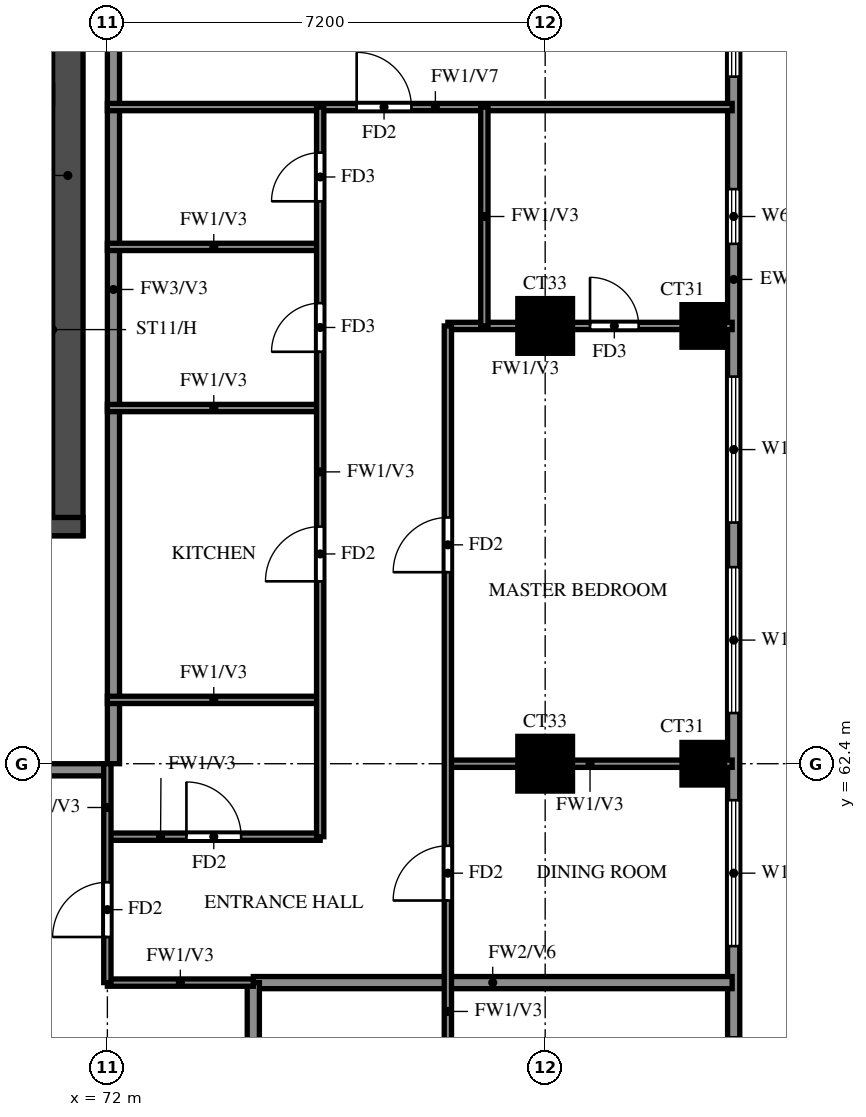
"""IFC4 building model, lengths in metres.
Left out: names, types, materials, properties, quantities, classifications, styles, units other than length and angle.
Written with IfcOpenShell. Run it as: python <this file> out.ifc"""

import sys

from ifc_helpers import new_model, si_unit, direction, frame, frame_2d, origin, origin_2d, place, context, subcontext, project, spatial, rectangle, extrude, source, transform, mapped, element, fill, save


model = new_model("IFC4")
c1 = context("Model", 3, precision=1e-05, world=origin(), true_north=direction((0.0, 1.0)))
c2 = subcontext(c1, "Body", "Model", "MODEL_VIEW")
j1 = project(units=[si_unit("LENGTHUNIT", "METRE"), si_unit("PLANEANGLEUNIT", "RADIAN")], contexts=[c1])
p1 = place(None, origin())
s1 = spatial("IfcSite", under=j1, at=p1, CompositionType="ELEMENT")
p2 = place(p1, origin())
s2 = spatial("IfcBuilding", under=s1, at=p2, CompositionType="ELEMENT")
p3 = place(p2, frame((0.0, 0.0, 211.5)))
s3 = spatial("IfcBuildingStorey", under=s2, at=p3, CompositionType="ELEMENT", Elevation=211.5)
m1 = source(origin(), c2, "Body", "SweptSolid", [
    extrude(rectangle(XDim=0.9, YDim=0.9, at=origin_2d()), origin(), (0.0, 0.0, 1.0), 3.22),
])
p4 = place(p3, frame((79.2, 62.4, 0.0), z_axis=(0.0, 0.0, 1.0), x_axis=(1.0, 0.0, 0.0)))
e1 = element("IfcColumn", 1, at=p4, inside=s3, PredefinedType="COLUMN", context=c2, shape_type="MappedRepresentation", body=[
    mapped(m1, transform((0.0, 0.0, 0.0))),
])
m2 = source(origin(), c2, "Body", "SweptSolid", [
    extrude(rectangle(XDim=0.7, YDim=0.7, at=origin_2d()), origin(), (0.0, 0.0, 1.0), 3.5),
])
p5 = place(p3, frame((81.8, 62.4, -0.28), z_axis=(0.0, 0.0, 1.0), x_axis=(1.0, 0.0, 0.0)))
e2 = element("IfcColumn", 2, at=p5, inside=s3, PredefinedType="COLUMN", context=c2, shape_type="MappedRepresentation", body=[
    mapped(m2, transform((0.0, 0.0, 0.0))),
])
p6 = place(p3, frame((79.2, 69.6, 0.0), z_axis=(0.0, 0.0, 1.0), x_axis=(1.0, 0.0, 0.0)))
e3 = element("IfcColumn", 3, at=p6, inside=s3, PredefinedType="COLUMN", context=c2, shape_type="MappedRepresentation", body=[
    mapped(m1, transform((0.0, 0.0, 0.0))),
])
p7 = place(p3, frame((81.8, 69.6, -0.28), z_axis=(0.0, 0.0, 1.0), x_axis=(1.0, 0.0, 0.0)))
e4 = element("IfcColumn", 4, at=p7, inside=s3, PredefinedType="COLUMN", context=c2, shape_type="MappedRepresentation", body=[
    mapped(m2, transform((0.0, 0.0, 0.0))),
])
p8 = place(p3, frame((71.35, 66.15, 0.0), z_axis=(0.0, 0.0, 1.0), x_axis=(0.0, 1.0, 0.0)))
e5 = element("IfcWall", 5, at=p8, inside=s3, PredefinedType="SHEAR", context=c2, shape_type="SweptSolid", body=[
    extrude(rectangle(XDim=11.85, YDim=0.5, at=frame_2d((5.925, 0.0))), origin(), (0.0, 0.0, 1.0), 3.22),
])
p9 = place(p3, frame((29.2, 66.3, 0.0), z_axis=(0.0, 0.0, 1.0), x_axis=(1.0, 0.0, 0.0)))
e6 = element("IfcWall", 6, at=p9, inside=s3, PredefinedType="SHEAR", context=c2, shape_type="SweptSolid", body=[
    extrude(rectangle(XDim=42.4, YDim=0.3, at=frame_2d((21.2, 0.0))), origin(), (0.0, 0.0, 1.0), 3.22),
])
p10 = place(p9, frame((1.425, 0.0, 0.0)))
e7 = element("IfcOpeningElement", 7, at=p10, cuts=e6, PredefinedType="OPENING", context=c2, shape_type="SweptSolid", body=[
    extrude(rectangle(XDim=1.1, YDim=2.1, at=frame_2d((0.55, 1.05))), frame((0.0, 0.16, 0.0), z_axis=(0.0, -1.0, 0.0), x_axis=(1.0, 0.0, 0.0)), (0.0, 0.0, 1.0), 0.32),
])
p11 = place(p9, frame((4.2, 0.0, 0.0)))
e8 = element("IfcOpeningElement", 8, at=p11, cuts=e6, PredefinedType="OPENING", context=c2, shape_type="SweptSolid", body=[
    extrude(rectangle(XDim=1.8, YDim=2.1, at=frame_2d((0.9, 1.05))), frame((0.0, 0.16, 0.0), z_axis=(0.0, -1.0, 0.0), x_axis=(1.0, 0.0, 0.0)), (0.0, 0.0, 1.0), 0.32),
])
p12 = place(p3, frame((82.3, 48.2, 0.0), z_axis=(0.0, 0.0, 1.0), x_axis=(0.0, 1.0, 0.0)))
e9 = element("IfcWall", 9, at=p12, inside=s3, PredefinedType="SOLIDWALL", context=c2, shape_type="SweptSolid", body=[
    extrude(rectangle(XDim=28.6, YDim=0.2, at=frame_2d((14.3, 0.0))), origin(), (0.0, 0.0, 1.0), 3.22),
])
p13 = place(p12, frame((4.3, 0.0, 0.0)))
e10 = element("IfcOpeningElement", 10, at=p13, cuts=e9, PredefinedType="OPENING", context=c2, shape_type="SweptSolid", body=[
    extrude(rectangle(XDim=1.8, YDim=2.4, at=frame_2d((0.9, 1.2))), frame((0.0, 0.11, 0.0), z_axis=(0.0, -1.0, 0.0), x_axis=(1.0, 0.0, 0.0)), (0.0, 0.0, 1.0), 0.22),
])
p14 = place(p12, frame((0.6, 0.0, 0.6)))
e11 = element("IfcOpeningElement", 11, at=p14, cuts=e9, PredefinedType="OPENING", context=c2, shape_type="SweptSolid", body=[
    extrude(rectangle(XDim=2.4, YDim=2.4, at=frame_2d((1.2, 1.2))), frame((0.0, 0.11, 0.0), z_axis=(0.0, -1.0, 0.0), x_axis=(1.0, 0.0, 0.0)), (0.0, 0.0, 1.0), 0.22),
])
p15 = place(p12, frame((7.3, 0.0, 0.6)))
e12 = element("IfcOpeningElement", 12, at=p15, cuts=e9, PredefinedType="OPENING", context=c2, shape_type="SweptSolid", body=[
    extrude(rectangle(XDim=2.4, YDim=2.4, at=frame_2d((1.2, 1.2))), frame((0.0, 0.11, 0.0), z_axis=(0.0, -1.0, 0.0), x_axis=(1.0, 0.0, 0.0)), (0.0, 0.0, 1.0), 0.22),
])
p16 = place(p12, frame((11.2, 0.0, 0.6)))
e13 = element("IfcOpeningElement", 13, at=p16, cuts=e9, PredefinedType="OPENING", context=c2, shape_type="SweptSolid", body=[
    extrude(rectangle(XDim=2.4, YDim=2.4, at=frame_2d((1.2, 1.2))), frame((0.0, 0.11, 0.0), z_axis=(0.0, -1.0, 0.0), x_axis=(1.0, 0.0, 0.0)), (0.0, 0.0, 1.0), 0.22),
])
p17 = place(p12, frame((15.033, 0.0, 0.6)))
e14 = element("IfcOpeningElement", 14, at=p17, cuts=e9, PredefinedType="OPENING", context=c2, shape_type="SweptSolid", body=[
    extrude(rectangle(XDim=2.4, YDim=2.4, at=frame_2d((1.2, 1.2))), frame((0.0, 0.11, 0.0), z_axis=(0.0, -1.0, 0.0), x_axis=(1.0, 0.0, 0.0)), (0.0, 0.0, 1.0), 0.22),
])
p18 = place(p12, frame((18.167, 0.0, 0.6)))
e15 = element("IfcOpeningElement", 15, at=p18, cuts=e9, PredefinedType="OPENING", context=c2, shape_type="SweptSolid", body=[
    extrude(rectangle(XDim=2.4, YDim=2.4, at=frame_2d((1.2, 1.2))), frame((0.0, 0.11, 0.0), z_axis=(0.0, -1.0, 0.0), x_axis=(1.0, 0.0, 0.0)), (0.0, 0.0, 1.0), 0.22),
])
p19 = place(p12, frame((22.75, 0.0, 1.5)))
e16 = element("IfcOpeningElement", 16, at=p19, cuts=e9, PredefinedType="OPENING", context=c2, shape_type="SweptSolid", body=[
    extrude(rectangle(XDim=0.9, YDim=0.9, at=frame_2d((0.45, 0.45))), frame((0.0, 0.11, 0.0), z_axis=(0.0, -1.0, 0.0), x_axis=(1.0, 0.0, 0.0)), (0.0, 0.0, 1.0), 0.22),
])
p20 = place(p12, frame((25.5, 0.0, 0.6)))
e17 = element("IfcOpeningElement", 17, at=p20, cuts=e9, PredefinedType="OPENING", context=c2, shape_type="SweptSolid", body=[
    extrude(rectangle(XDim=2.4, YDim=2.4, at=frame_2d((1.2, 1.2))), frame((0.0, 0.11, 0.0), z_axis=(0.0, -1.0, 0.0), x_axis=(1.0, 0.0, 0.0)), (0.0, 0.0, 1.0), 0.22),
])
p21 = place(p3, frame((67.2, 62.3, 0.0), z_axis=(0.0, 0.0, 1.0), x_axis=(1.0, 0.0, 0.0)))
e18 = element("IfcWall", 18, at=p21, inside=s3, PredefinedType="SOLIDWALL", context=c2, shape_type="SweptSolid", body=[
    extrude(rectangle(XDim=4.8, YDim=0.2, at=frame_2d((2.4, 0.0))), origin(), (0.0, 0.0, 1.0), 3.22),
])
p22 = place(p3, frame((72.1, 62.4, 0.0), z_axis=(0.0, 0.0, 1.0), x_axis=(0.0, 1.0, 0.0)))
e19 = element("IfcWall", 19, at=p22, inside=s3, PredefinedType="SOLIDWALL", context=c2, shape_type="SweptSolid", body=[
    extrude(rectangle(XDim=15.6, YDim=0.2, at=frame_2d((7.8, 0.0))), origin(), (0.0, 0.0, 1.0), 3.22),
])
p23 = place(p3, frame((74.4, 58.8, 0.0), z_axis=(0.0, 0.0, 1.0), x_axis=(1.0, 0.0, 0.0)))
e20 = element("IfcWall", 20, at=p23, inside=s3, PredefinedType="SOLIDWALL", context=c2, shape_type="SweptSolid", body=[
    extrude(rectangle(XDim=7.875, YDim=0.2, at=frame_2d((3.938, 0.0))), origin(), (0.0, 0.0, 1.0), 2.32),
])
p24 = place(p3, frame((74.4, 56.4, 0.0), z_axis=(0.0, 0.0, 1.0), x_axis=(0.0, 1.0, 0.0)))
e21 = element("IfcWall", 21, at=p24, inside=s3, PredefinedType="SOLIDWALL", context=c2, shape_type="SweptSolid", body=[
    extrude(rectangle(XDim=2.4, YDim=0.2, at=frame_2d((1.2, 0.0))), origin(), (0.0, 0.0, 1.0), 3.22),
])
p25 = place(p3, frame((72.0, 58.8, 0.0), z_axis=(0.0, 0.0, 1.0), x_axis=(1.0, 0.0, 0.0)))
e22 = element("IfcWall", 22, at=p25, inside=s3, PredefinedType="PARTITIONING", context=c2, shape_type="SweptSolid", body=[
    extrude(rectangle(XDim=2.4, YDim=0.12, at=frame_2d((1.2, 0.0))), origin(), (0.0, 0.0, 1.0), 3.22),
])
p26 = place(p3, frame((72.0, 61.2, 0.0), z_axis=(0.0, 0.0, 1.0), x_axis=(1.0, 0.0, 0.0)))
e23 = element("IfcWall", 23, at=p26, inside=s3, PredefinedType="PARTITIONING", context=c2, shape_type="SweptSolid", body=[
    extrude(rectangle(XDim=3.5, YDim=0.12, at=frame_2d((1.75, 0.0))), origin(), (0.0, 0.0, 1.0), 3.22),
])
p27 = place(p26, frame((1.3, 0.0, 0.0)))
e24 = element("IfcOpeningElement", 24, at=p27, cuts=e23, PredefinedType="OPENING", context=c2, shape_type="SweptSolid", body=[
    extrude(rectangle(XDim=0.9, YDim=2.1, at=frame_2d((0.45, 1.05))), frame((0.0, 0.07, 0.0), z_axis=(0.0, -1.0, 0.0), x_axis=(1.0, 0.0, 0.0)), (0.0, 0.0, 1.0), 0.14),
])
p28 = place(p3, frame((77.6, 62.4, 0.0), z_axis=(0.0, 0.0, 1.0), x_axis=(1.0, 0.0, 0.0)))
e25 = element("IfcWall", 25, at=p28, inside=s3, PredefinedType="PARTITIONING", context=c2, shape_type="SweptSolid", body=[
    extrude(rectangle(XDim=4.675, YDim=0.12, at=frame_2d((2.337, 0.0))), origin(), (0.0, 0.0, 1.0), 3.22),
])
for number, where, z_axis, x_axis in (
    (26, (72.0, 63.45, 0.0), (0.0, 0.0, 1.0), (1.0, 0.0, 0.0)),
    (27, (72.0, 68.25, 0.0), (0.0, 0.0, 1.0), (1.0, 0.0, 0.0)),
):
    element("IfcWall", number, at=place(p3, frame(where, z_axis=z_axis, x_axis=x_axis)), inside=s3, PredefinedType="PARTITIONING", context=c2, shape_type="SweptSolid", body=[
        extrude(rectangle(XDim=3.5, YDim=0.12, at=frame_2d((1.75, 0.0))), origin(), (0.0, 0.0, 1.0), 3.22),
    ])
p29 = place(p3, frame((77.6, 69.6, 0.0), z_axis=(0.0, 0.0, 1.0), x_axis=(1.0, 0.0, 0.0)))
e28 = element("IfcWall", 28, at=p29, inside=s3, PredefinedType="PARTITIONING", context=c2, shape_type="SweptSolid", body=[
    extrude(rectangle(XDim=4.675, YDim=0.12, at=frame_2d((2.337, 0.0))), origin(), (0.0, 0.0, 1.0), 3.22),
])
p30 = place(p29, frame((2.337, 0.0, 0.0)))
e29 = element("IfcOpeningElement", 29, at=p30, cuts=e28, PredefinedType="OPENING", context=c2, shape_type="SweptSolid", body=[
    extrude(rectangle(XDim=0.8, YDim=2.1, at=frame_2d((0.4, 1.05))), frame((0.0, 0.07, 0.0), z_axis=(0.0, -1.0, 0.0), x_axis=(1.0, 0.0, 0.0)), (0.0, 0.0, 1.0), 0.14),
])
p31 = place(p3, frame((72.0, 70.9, 0.0), z_axis=(0.0, 0.0, 1.0), x_axis=(1.0, 0.0, 0.0)))
e30 = element("IfcWall", 30, at=p31, inside=s3, PredefinedType="PARTITIONING", context=c2, shape_type="SweptSolid", body=[
    extrude(rectangle(XDim=3.5, YDim=0.12, at=frame_2d((1.75, 0.0))), origin(), (0.0, 0.0, 1.0), 3.22),
])
p32 = place(p3, frame((72.0, 73.2, 0.0), z_axis=(0.0, 0.0, 1.0), x_axis=(1.0, 0.0, 0.0)))
e31 = element("IfcWall", 31, at=p32, inside=s3, PredefinedType="PARTITIONING", context=c2, shape_type="SweptSolid", body=[
    extrude(rectangle(XDim=10.275, YDim=0.12, at=frame_2d((5.137, 0.0))), origin(), (0.0, 0.0, 1.0), 2.32),
])
p33 = place(p32, frame((4.1, 0.0, 0.0)))
e32 = element("IfcOpeningElement", 32, at=p33, cuts=e31, PredefinedType="OPENING", context=c2, shape_type="SweptSolid", body=[
    extrude(rectangle(XDim=0.9, YDim=2.1, at=frame_2d((0.45, 1.05))), frame((0.0, 0.07, 0.0), z_axis=(0.0, -1.0, 0.0), x_axis=(1.0, 0.0, 0.0)), (0.0, 0.0, 1.0), 0.14),
])
p34 = place(p3, frame((72.0, 58.8, 0.0), z_axis=(0.0, 0.0, 1.0), x_axis=(0.0, 1.0, 0.0)))
e33 = element("IfcWall", 33, at=p34, inside=s3, PredefinedType="PARTITIONING", context=c2, shape_type="SweptSolid", body=[
    extrude(rectangle(XDim=3.6, YDim=0.12, at=frame_2d((1.8, 0.0))), origin(), (0.0, 0.0, 1.0), 3.22),
])
p35 = place(p34, frame((0.75, 0.0, 0.0)))
e34 = element("IfcOpeningElement", 34, at=p35, cuts=e33, PredefinedType="OPENING", context=c2, shape_type="SweptSolid", body=[
    extrude(rectangle(XDim=0.9, YDim=2.1, at=frame_2d((0.45, 1.05))), frame((0.0, 0.07, 0.0), z_axis=(0.0, -1.0, 0.0), x_axis=(1.0, 0.0, 0.0)), (0.0, 0.0, 1.0), 0.14),
])
p36 = place(p3, frame((75.5, 61.2, 0.0), z_axis=(0.0, 0.0, 1.0), x_axis=(0.0, 1.0, 0.0)))
e35 = element("IfcWall", 35, at=p36, inside=s3, PredefinedType="PARTITIONING", context=c2, shape_type="SweptSolid", body=[
    extrude(rectangle(XDim=12.0, YDim=0.12, at=frame_2d((6.0, 0.0))), origin(), (0.0, 0.0, 1.0), 3.22),
])
p37 = place(p36, frame((4.2, 0.0, 0.0)))
e36 = element("IfcOpeningElement", 36, at=p37, cuts=e35, PredefinedType="OPENING", context=c2, shape_type="SweptSolid", body=[
    extrude(rectangle(XDim=0.9, YDim=2.1, at=frame_2d((0.45, 1.05))), frame((0.0, 0.07, 0.0), z_axis=(0.0, -1.0, 0.0), x_axis=(1.0, 0.0, 0.0)), (0.0, 0.0, 1.0), 0.14),
])
p38 = place(p36, frame((7.975, 0.0, 0.0)))
e37 = element("IfcOpeningElement", 37, at=p38, cuts=e35, PredefinedType="OPENING", context=c2, shape_type="SweptSolid", body=[
    extrude(rectangle(XDim=0.8, YDim=2.1, at=frame_2d((0.4, 1.05))), frame((0.0, 0.07, 0.0), z_axis=(0.0, -1.0, 0.0), x_axis=(1.0, 0.0, 0.0)), (0.0, 0.0, 1.0), 0.14),
])
p39 = place(p36, frame((10.45, 0.0, 0.0)))
e38 = element("IfcOpeningElement", 38, at=p39, cuts=e35, PredefinedType="OPENING", context=c2, shape_type="SweptSolid", body=[
    extrude(rectangle(XDim=0.8, YDim=2.1, at=frame_2d((0.4, 1.05))), frame((0.0, 0.07, 0.0), z_axis=(0.0, -1.0, 0.0), x_axis=(1.0, 0.0, 0.0)), (0.0, 0.0, 1.0), 0.14),
])
p40 = place(p3, frame((77.6, 48.125, 0.0), z_axis=(0.0, 0.0, 1.0), x_axis=(0.0, 1.0, 0.0)))
e39 = element("IfcWall", 39, at=p40, inside=s3, PredefinedType="PARTITIONING", context=c2, shape_type="SweptSolid", body=[
    extrude(rectangle(XDim=21.475, YDim=0.12, at=frame_2d((10.738, 0.0))), origin(), (0.0, 0.0, 1.0), 3.22),
])
p41 = place(p40, frame((1.288, 0.0, 0.0)))
e40 = element("IfcOpeningElement", 40, at=p41, cuts=e39, PredefinedType="OPENING", context=c2, shape_type="SweptSolid", body=[
    extrude(rectangle(XDim=0.9, YDim=2.1, at=frame_2d((0.45, 1.05))), frame((0.0, 0.07, 0.0), z_axis=(0.0, -1.0, 0.0), x_axis=(1.0, 0.0, 0.0)), (0.0, 0.0, 1.0), 0.14),
])
p42 = place(p40, frame((7.825, 0.0, 0.0)))
e41 = element("IfcOpeningElement", 41, at=p42, cuts=e39, PredefinedType="OPENING", context=c2, shape_type="SweptSolid", body=[
    extrude(rectangle(XDim=1.5, YDim=2.1, at=frame_2d((0.75, 1.05))), frame((0.0, 0.07, 0.0), z_axis=(0.0, -1.0, 0.0), x_axis=(1.0, 0.0, 0.0)), (0.0, 0.0, 1.0), 0.14),
])
p43 = place(p40, frame((12.025, 0.0, 0.0)))
e42 = element("IfcOpeningElement", 42, at=p43, cuts=e39, PredefinedType="OPENING", context=c2, shape_type="SweptSolid", body=[
    extrude(rectangle(XDim=0.9, YDim=2.1, at=frame_2d((0.45, 1.05))), frame((0.0, 0.07, 0.0), z_axis=(0.0, -1.0, 0.0), x_axis=(1.0, 0.0, 0.0)), (0.0, 0.0, 1.0), 0.14),
])
p44 = place(p40, frame((17.425, 0.0, 0.0)))
e43 = element("IfcOpeningElement", 43, at=p44, cuts=e39, PredefinedType="OPENING", context=c2, shape_type="SweptSolid", body=[
    extrude(rectangle(XDim=0.9, YDim=2.1, at=frame_2d((0.45, 1.05))), frame((0.0, 0.07, 0.0), z_axis=(0.0, -1.0, 0.0), x_axis=(1.0, 0.0, 0.0)), (0.0, 0.0, 1.0), 0.14),
])
p45 = place(p3, frame((78.2, 69.6, 0.0), z_axis=(0.0, 0.0, 1.0), x_axis=(0.0, 1.0, 0.0)))
e44 = element("IfcWall", 44, at=p45, inside=s3, PredefinedType="PARTITIONING", context=c2, shape_type="SweptSolid", body=[
    extrude(rectangle(XDim=3.6, YDim=0.12, at=frame_2d((1.8, 0.0))), origin(), (0.0, 0.0, 1.0), 3.22),
])
p46 = place(p16, origin())
e45 = element("IfcWindow", 45, at=p46, inside=s3, PartitioningType="DOUBLE_PANEL_VERTICAL", PredefinedType="WINDOW", context=c2, shape_type="SweptSolid", body=[
    extrude(rectangle(XDim=2.4, YDim=2.4, at=frame_2d((1.2, 1.2))), frame((0.0, 0.03, 0.0), z_axis=(0.0, -1.0, 0.0), x_axis=(1.0, 0.0, 0.0)), (0.0, 0.0, 1.0), 0.06),
])
fill(e13, e45)
p47 = place(p17, origin())
e46 = element("IfcWindow", 46, at=p47, inside=s3, PartitioningType="DOUBLE_PANEL_VERTICAL", PredefinedType="WINDOW", context=c2, shape_type="SweptSolid", body=[
    extrude(rectangle(XDim=2.4, YDim=2.4, at=frame_2d((1.2, 1.2))), frame((0.0, 0.03, 0.0), z_axis=(0.0, -1.0, 0.0), x_axis=(1.0, 0.0, 0.0)), (0.0, 0.0, 1.0), 0.06),
])
fill(e14, e46)
p48 = place(p18, origin())
e47 = element("IfcWindow", 47, at=p48, inside=s3, PartitioningType="DOUBLE_PANEL_VERTICAL", PredefinedType="WINDOW", context=c2, shape_type="SweptSolid", body=[
    extrude(rectangle(XDim=2.4, YDim=2.4, at=frame_2d((1.2, 1.2))), frame((0.0, 0.03, 0.0), z_axis=(0.0, -1.0, 0.0), x_axis=(1.0, 0.0, 0.0)), (0.0, 0.0, 1.0), 0.06),
])
fill(e15, e47)
p49 = place(p19, origin())
e48 = element("IfcWindow", 48, at=p49, inside=s3, PartitioningType="SINGLE_PANEL", PredefinedType="WINDOW", context=c2, shape_type="SweptSolid", body=[
    extrude(rectangle(XDim=0.9, YDim=0.9, at=frame_2d((0.45, 0.45))), frame((0.0, 0.03, 0.0), z_axis=(0.0, -1.0, 0.0), x_axis=(1.0, 0.0, 0.0)), (0.0, 0.0, 1.0), 0.06),
])
fill(e16, e48)
p50 = place(p20, origin())
e49 = element("IfcWindow", 49, at=p50, inside=s3, PartitioningType="DOUBLE_PANEL_VERTICAL", PredefinedType="WINDOW", context=c2, shape_type="SweptSolid", body=[
    extrude(rectangle(XDim=2.4, YDim=2.4, at=frame_2d((1.2, 1.2))), frame((0.0, 0.03, 0.0), z_axis=(0.0, -1.0, 0.0), x_axis=(1.0, 0.0, 0.0)), (0.0, 0.0, 1.0), 0.06),
])
fill(e17, e49)
p51 = place(p35, origin())
e50 = element("IfcDoor", 50, at=p51, inside=s3, OperationType="SINGLE_SWING_LEFT", PredefinedType="DOOR", context=c2, shape_type="SweptSolid", body=[
    extrude(rectangle(XDim=0.9, YDim=2.1, at=frame_2d((0.45, 1.05))), frame((0.0, 0.025, 0.0), z_axis=(0.0, -1.0, 0.0), x_axis=(1.0, 0.0, 0.0)), (0.0, 0.0, 1.0), 0.05),
])
fill(e34, e50)
p52 = place(p43, origin())
e51 = element("IfcDoor", 51, at=p52, inside=s3, OperationType="SINGLE_SWING_RIGHT", PredefinedType="DOOR", context=c2, shape_type="SweptSolid", body=[
    extrude(rectangle(XDim=0.9, YDim=2.1, at=frame_2d((0.45, 1.05))), frame((0.0, 0.025, 0.0), z_axis=(0.0, -1.0, 0.0), x_axis=(1.0, 0.0, 0.0)), (0.0, 0.0, 1.0), 0.05),
])
fill(e42, e51)
p53 = place(p44, origin())
e52 = element("IfcDoor", 52, at=p53, inside=s3, OperationType="SINGLE_SWING_LEFT", PredefinedType="DOOR", context=c2, shape_type="SweptSolid", body=[
    extrude(rectangle(XDim=0.9, YDim=2.1, at=frame_2d((0.45, 1.05))), frame((0.0, 0.025, 0.0), z_axis=(0.0, -1.0, 0.0), x_axis=(1.0, 0.0, 0.0)), (0.0, 0.0, 1.0), 0.05),
])
fill(e43, e52)
p54 = place(p30, origin())
e53 = element("IfcDoor", 53, at=p54, inside=s3, OperationType="SINGLE_SWING_RIGHT", PredefinedType="DOOR", context=c2, shape_type="SweptSolid", body=[
    extrude(rectangle(XDim=0.8, YDim=2.1, at=frame_2d((0.4, 1.05))), frame((0.0, 0.025, 0.0), z_axis=(0.0, -1.0, 0.0), x_axis=(1.0, 0.0, 0.0)), (0.0, 0.0, 1.0), 0.05),
])
fill(e29, e53)
p55 = place(p33, origin())
e54 = element("IfcDoor", 54, at=p55, inside=s3, OperationType="SINGLE_SWING_RIGHT", PredefinedType="DOOR", context=c2, shape_type="SweptSolid", body=[
    extrude(rectangle(XDim=0.9, YDim=2.1, at=frame_2d((0.45, 1.05))), frame((0.0, 0.025, 0.0), z_axis=(0.0, -1.0, 0.0), x_axis=(1.0, 0.0, 0.0)), (0.0, 0.0, 1.0), 0.05),
])
fill(e32, e54)
p56 = place(p27, origin())
e55 = element("IfcDoor", 55, at=p56, inside=s3, OperationType="SINGLE_SWING_LEFT", PredefinedType="DOOR", context=c2, shape_type="SweptSolid", body=[
    extrude(rectangle(XDim=0.9, YDim=2.1, at=frame_2d((0.45, 1.05))), frame((0.0, 0.025, 0.0), z_axis=(0.0, -1.0, 0.0), x_axis=(1.0, 0.0, 0.0)), (0.0, 0.0, 1.0), 0.05),
])
fill(e24, e55)
p57 = place(p37, origin())
e56 = element("IfcDoor", 56, at=p57, inside=s3, OperationType="SINGLE_SWING_LEFT", PredefinedType="DOOR", context=c2, shape_type="SweptSolid", body=[
    extrude(rectangle(XDim=0.9, YDim=2.1, at=frame_2d((0.45, 1.05))), frame((0.0, 0.025, 0.0), z_axis=(0.0, -1.0, 0.0), x_axis=(1.0, 0.0, 0.0)), (0.0, 0.0, 1.0), 0.05),
])
fill(e36, e56)
p58 = place(p38, origin())
e57 = element("IfcDoor", 57, at=p58, inside=s3, OperationType="SINGLE_SWING_RIGHT", PredefinedType="DOOR", context=c2, shape_type="SweptSolid", body=[
    extrude(rectangle(XDim=0.8, YDim=2.1, at=frame_2d((0.4, 1.05))), frame((0.0, 0.025, 0.0), z_axis=(0.0, -1.0, 0.0), x_axis=(1.0, 0.0, 0.0)), (0.0, 0.0, 1.0), 0.05),
])
fill(e37, e57)
p59 = place(p39, origin())
e58 = element("IfcDoor", 58, at=p59, inside=s3, OperationType="SINGLE_SWING_LEFT", PredefinedType="DOOR", context=c2, shape_type="SweptSolid", body=[
    extrude(rectangle(XDim=0.8, YDim=2.1, at=frame_2d((0.4, 1.05))), frame((0.0, 0.025, 0.0), z_axis=(0.0, -1.0, 0.0), x_axis=(1.0, 0.0, 0.0)), (0.0, 0.0, 1.0), 0.05),
])
fill(e38, e58)
save(model, sys.argv[1])
